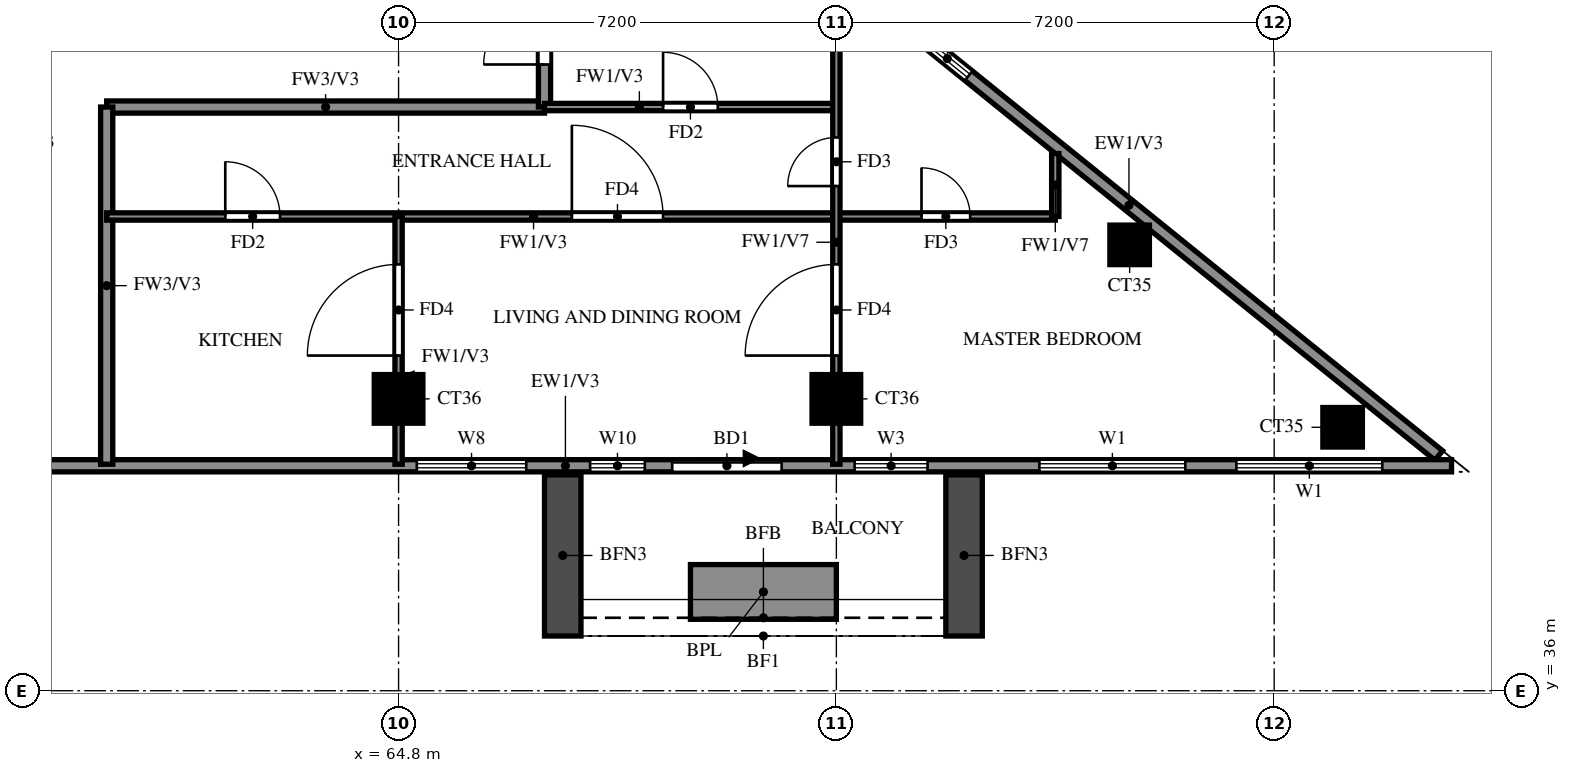
"""IFC4 building model, lengths in metres.
Left out: names, types, materials, properties, quantities, classifications, styles, units other than length and angle.
Written with IfcOpenShell. Run it as: python <this file> out.ifc"""

import sys

from ifc_helpers import new_model, si_unit, direction, frame, frame_2d, origin, origin_2d, place, context, subcontext, project, spatial, rectangle, extrude, source, transform, mapped, element, fill, save


model = new_model("IFC4")
c1 = context("Model", 3, precision=1e-05, world=origin(), true_north=direction((0.0, 1.0)))
c2 = subcontext(c1, "Body", "Model", "MODEL_VIEW")
j1 = project(units=[si_unit("LENGTHUNIT", "METRE"), si_unit("PLANEANGLEUNIT", "RADIAN")], contexts=[c1])
p1 = place(None, origin())
s1 = spatial("IfcSite", under=j1, at=p1, CompositionType="ELEMENT")
p2 = place(p1, origin())
s2 = spatial("IfcBuilding", under=s1, at=p2, CompositionType="ELEMENT")
p3 = place(p2, frame((0.0, 0.0, 236.0)))
s3 = spatial("IfcBuildingStorey", under=s2, at=p3, CompositionType="ELEMENT", Elevation=236.0)
m1 = source(origin(), c2, "Body", "SweptSolid", [
    extrude(rectangle(XDim=0.65, YDim=0.65, at=origin_2d()), origin(), (0.0, 0.0, 1.0), 3.22),
])
p4 = place(p3, frame((80.326, 40.333, 0.0), z_axis=(0.0, 0.0, 1.0), x_axis=(1.0, 0.0, 0.0)))
e1 = element("IfcColumn", 1, at=p4, inside=s3, PredefinedType="COLUMN", context=c2, shape_type="MappedRepresentation", body=[
    mapped(m1, transform((0.0, 0.0, 0.0))),
])
m2 = source(origin(), c2, "Body", "SweptSolid", [
    extrude(rectangle(XDim=0.8, YDim=0.8, at=origin_2d()), origin(), (0.0, 0.0, 1.0), 3.22),
])
for number, where, z_axis, x_axis in (
    (2, (64.8, 40.8, 0.0), (0.0, 0.0, 1.0), (1.0, 0.0, 0.0)),
    (3, (72.0, 40.8, 0.0), (0.0, 0.0, 1.0), (1.0, 0.0, 0.0)),
):
    element("IfcColumn", number, at=place(p3, frame(where, z_axis=z_axis, x_axis=x_axis)), inside=s3, PredefinedType="COLUMN", context=c2, shape_type="MappedRepresentation", body=[
        mapped(m2, transform((0.0, 0.0, 0.0))),
    ])
p5 = place(p3, frame((76.823, 43.333, 0.0), z_axis=(0.0, 0.0, 1.0), x_axis=(1.0, 0.0, 0.0)))
e4 = element("IfcColumn", 4, at=p5, inside=s3, PredefinedType="COLUMN", context=c2, shape_type="MappedRepresentation", body=[
    mapped(m1, transform((0.0, 0.0, 0.0))),
])
p6 = place(p3, frame((81.907, 39.87, 0.0), z_axis=(0.0, 0.0, 1.0), x_axis=(-0.777936274417, 0.62834318087, 0.0)))
e5 = element("IfcWall", 5, at=p6, inside=s3, PredefinedType="SOLIDWALL", context=c2, shape_type="SweptSolid", body=[
    extrude(rectangle(XDim=13.099, YDim=0.2, at=frame_2d((6.549, 0.0))), origin(), (0.0, 0.0, 1.0), 3.22),
])
p7 = place(p6, frame((9.938, 0.0, 1.5)))
e6 = element("IfcOpeningElement", 6, at=p7, cuts=e5, PredefinedType="OPENING", context=c2, shape_type="SweptSolid", body=[
    extrude(rectangle(XDim=0.9, YDim=0.9, at=frame_2d((0.45, 0.45))), frame((0.0, 0.11, 0.0), z_axis=(0.0, -1.0, 0.0), x_axis=(1.0, 0.0, 0.0)), (0.0, 0.0, 1.0), 0.22),
])
p8 = place(p3, frame((58.8, 39.7, 0.0), z_axis=(0.0, 0.0, 1.0), x_axis=(1.0, 0.0, 0.0)))
e7 = element("IfcWall", 7, at=p8, inside=s3, PredefinedType="SOLIDWALL", context=c2, shape_type="SweptSolid", body=[
    extrude(rectangle(XDim=23.317, YDim=0.2, at=frame_2d((11.658, 0.0))), origin(), (0.0, 0.0, 1.0), 3.22),
])
p9 = place(p8, frame((10.5, 0.0, 0.0)))
e8 = element("IfcOpeningElement", 8, at=p9, cuts=e7, PredefinedType="OPENING", context=c2, shape_type="SweptSolid", body=[
    extrude(rectangle(XDim=1.8, YDim=2.4, at=frame_2d((0.9, 1.2))), frame((0.0, 0.11, 0.0), z_axis=(0.0, -1.0, 0.0), x_axis=(1.0, 0.0, 0.0)), (0.0, 0.0, 1.0), 0.22),
])
p10 = place(p8, frame((6.3, 0.0, 0.6)))
e9 = element("IfcOpeningElement", 9, at=p10, cuts=e7, PredefinedType="OPENING", context=c2, shape_type="SweptSolid", body=[
    extrude(rectangle(XDim=1.8, YDim=2.4, at=frame_2d((0.9, 1.2))), frame((0.0, 0.11, 0.0), z_axis=(0.0, -1.0, 0.0), x_axis=(1.0, 0.0, 0.0)), (0.0, 0.0, 1.0), 0.22),
])
p11 = place(p8, frame((9.15, 0.0, 0.6)))
e10 = element("IfcOpeningElement", 10, at=p11, cuts=e7, PredefinedType="OPENING", context=c2, shape_type="SweptSolid", body=[
    extrude(rectangle(XDim=0.9, YDim=2.4, at=frame_2d((0.45, 1.2))), frame((0.0, 0.11, 0.0), z_axis=(0.0, -1.0, 0.0), x_axis=(1.0, 0.0, 0.0)), (0.0, 0.0, 1.0), 0.22),
])
p12 = place(p8, frame((13.5, 0.0, 0.6)))
e11 = element("IfcOpeningElement", 11, at=p12, cuts=e7, PredefinedType="OPENING", context=c2, shape_type="SweptSolid", body=[
    extrude(rectangle(XDim=1.2, YDim=2.4, at=frame_2d((0.6, 1.2))), frame((0.0, 0.11, 0.0), z_axis=(0.0, -1.0, 0.0), x_axis=(1.0, 0.0, 0.0)), (0.0, 0.0, 1.0), 0.22),
])
p13 = place(p8, frame((16.539, 0.0, 0.6)))
e12 = element("IfcOpeningElement", 12, at=p13, cuts=e7, PredefinedType="OPENING", context=c2, shape_type="SweptSolid", body=[
    extrude(rectangle(XDim=2.4, YDim=2.4, at=frame_2d((1.2, 1.2))), frame((0.0, 0.11, 0.0), z_axis=(0.0, -1.0, 0.0), x_axis=(1.0, 0.0, 0.0)), (0.0, 0.0, 1.0), 0.22),
])
p14 = place(p8, frame((19.778, 0.0, 0.6)))
e13 = element("IfcOpeningElement", 13, at=p14, cuts=e7, PredefinedType="OPENING", context=c2, shape_type="SweptSolid", body=[
    extrude(rectangle(XDim=2.4, YDim=2.4, at=frame_2d((1.2, 1.2))), frame((0.0, 0.11, 0.0), z_axis=(0.0, -1.0, 0.0), x_axis=(1.0, 0.0, 0.0)), (0.0, 0.0, 1.0), 0.22),
])
for number, where, z_axis, x_axis in (
    (14, (67.5, 39.55, 0.0), (0.0, 0.0, 1.0), (0.0, -1.0, 0.0)),
    (15, (74.1, 39.55, 0.0), (0.0, 0.0, 1.0), (0.0, -1.0, 0.0)),
):
    element("IfcWall", number, at=place(p3, frame(where, z_axis=z_axis, x_axis=x_axis)), inside=s3, PredefinedType="SOLIDWALL", context=c2, shape_type="SweptSolid", body=[
        extrude(rectangle(XDim=2.65, YDim=0.6, at=frame_2d((1.325, 0.0))), origin(), (0.0, 0.0, 1.0), 2.85),
    ])
p15 = place(p3, frame((69.6, 37.625, 0.0), z_axis=(0.0, 0.0, 1.0), x_axis=(1.0, 0.0, 0.0)))
e16 = element("IfcWall", 16, at=p15, inside=s3, PredefinedType="SOLIDWALL", context=c2, shape_type="SweptSolid", body=[
    extrude(rectangle(XDim=2.4, YDim=0.9, at=frame_2d((1.2, 0.0))), origin(), (0.0, 0.0, 1.0), 0.9),
])
p16 = place(p3, frame((60.0, 45.6, 0.0), z_axis=(0.0, 0.0, 1.0), x_axis=(1.0, 0.0, 0.0)))
e17 = element("IfcWall", 17, at=p16, inside=s3, PredefinedType="SOLIDWALL", context=c2, shape_type="SweptSolid", body=[
    extrude(rectangle(XDim=7.2, YDim=0.2, at=frame_2d((3.6, 0.0))), origin(), (0.0, 0.0, 1.0), 3.22),
])
p17 = place(p3, frame((60.0, 39.725, 0.0), z_axis=(0.0, 0.0, 1.0), x_axis=(0.0, 1.0, 0.0)))
e18 = element("IfcWall", 18, at=p17, inside=s3, PredefinedType="SOLIDWALL", context=c2, shape_type="SweptSolid", body=[
    extrude(rectangle(XDim=5.875, YDim=0.2, at=frame_2d((2.938, 0.0))), origin(), (0.0, 0.0, 1.0), 3.22),
])
p18 = place(p3, frame((67.2, 45.6, 0.0), z_axis=(0.0, 0.0, 1.0), x_axis=(0.0, 1.0, 0.0)))
e19 = element("IfcWall", 19, at=p18, inside=s3, PredefinedType="SOLIDWALL", context=c2, shape_type="SweptSolid", body=[
    extrude(rectangle(XDim=16.8, YDim=0.2, at=frame_2d((8.4, 0.0))), origin(), (0.0, 0.0, 1.0), 3.22),
])
p19 = place(p18, frame((6.7, 0.0, 0.0)))
e20 = element("IfcOpeningElement", 20, at=p19, cuts=e19, PredefinedType="OPENING", context=c2, shape_type="SweptSolid", body=[
    extrude(rectangle(XDim=1.0, YDim=2.1, at=frame_2d((0.5, 1.05))), frame((0.0, 0.11, 0.0), z_axis=(0.0, -1.0, 0.0), x_axis=(1.0, 0.0, 0.0)), (0.0, 0.0, 1.0), 0.22),
])
p20 = place(p18, frame((15.1, 0.0, 0.0)))
e21 = element("IfcOpeningElement", 21, at=p20, cuts=e19, PredefinedType="OPENING", context=c2, shape_type="SweptSolid", body=[
    extrude(rectangle(XDim=1.0, YDim=2.1, at=frame_2d((0.5, 1.05))), frame((0.0, 0.11, 0.0), z_axis=(0.0, -1.0, 0.0), x_axis=(1.0, 0.0, 0.0)), (0.0, 0.0, 1.0), 0.22),
])
p21 = place(p18, frame((0.7, 0.0, 0.0)))
e22 = element("IfcOpeningElement", 22, at=p21, cuts=e19, PredefinedType="OPENING", context=c2, shape_type="SweptSolid", body=[
    extrude(rectangle(XDim=1.0, YDim=2.1, at=frame_2d((0.5, 1.05))), frame((0.0, 0.11, 0.0), z_axis=(0.0, -1.0, 0.0), x_axis=(1.0, 0.0, 0.0)), (0.0, 0.0, 1.0), 0.22),
])
p22 = place(p3, frame((60.0, 43.8, 0.0), z_axis=(0.0, 0.0, 1.0), x_axis=(1.0, 0.0, 0.0)))
e23 = element("IfcWall", 23, at=p22, inside=s3, PredefinedType="PARTITIONING", context=c2, shape_type="SweptSolid", body=[
    extrude(rectangle(XDim=15.6, YDim=0.12, at=frame_2d((7.8, 0.0))), origin(), (0.0, 0.0, 1.0), 3.22),
])
p23 = place(p22, frame((7.65, 0.0, 0.0)))
e24 = element("IfcOpeningElement", 24, at=p23, cuts=e23, PredefinedType="OPENING", context=c2, shape_type="SweptSolid", body=[
    extrude(rectangle(XDim=1.5, YDim=2.1, at=frame_2d((0.75, 1.05))), frame((0.0, 0.07, 0.0), z_axis=(0.0, -1.0, 0.0), x_axis=(1.0, 0.0, 0.0)), (0.0, 0.0, 1.0), 0.14),
])
p24 = place(p22, frame((1.95, 0.0, 0.0)))
e25 = element("IfcOpeningElement", 25, at=p24, cuts=e23, PredefinedType="OPENING", context=c2, shape_type="SweptSolid", body=[
    extrude(rectangle(XDim=0.9, YDim=2.1, at=frame_2d((0.45, 1.05))), frame((0.0, 0.07, 0.0), z_axis=(0.0, -1.0, 0.0), x_axis=(1.0, 0.0, 0.0)), (0.0, 0.0, 1.0), 0.14),
])
p25 = place(p22, frame((13.4, 0.0, 0.0)))
e26 = element("IfcOpeningElement", 26, at=p25, cuts=e23, PredefinedType="OPENING", context=c2, shape_type="SweptSolid", body=[
    extrude(rectangle(XDim=0.8, YDim=2.1, at=frame_2d((0.4, 1.05))), frame((0.0, 0.07, 0.0), z_axis=(0.0, -1.0, 0.0), x_axis=(1.0, 0.0, 0.0)), (0.0, 0.0, 1.0), 0.14),
])
p26 = place(p3, frame((67.2, 45.6, 0.0), z_axis=(0.0, 0.0, 1.0), x_axis=(1.0, 0.0, 0.0)))
e27 = element("IfcWall", 27, at=p26, inside=s3, PredefinedType="PARTITIONING", context=c2, shape_type="SweptSolid", body=[
    extrude(rectangle(XDim=4.8, YDim=0.12, at=frame_2d((2.4, 0.0))), origin(), (0.0, 0.0, 1.0), 3.22),
])
p27 = place(p26, frame((1.95, 0.0, 0.0)))
e28 = element("IfcOpeningElement", 28, at=p27, cuts=e27, PredefinedType="OPENING", context=c2, shape_type="SweptSolid", body=[
    extrude(rectangle(XDim=0.9, YDim=2.1, at=frame_2d((0.45, 1.05))), frame((0.0, 0.07, 0.0), z_axis=(0.0, -1.0, 0.0), x_axis=(1.0, 0.0, 0.0)), (0.0, 0.0, 1.0), 0.14),
])
p28 = place(p3, frame((64.8, 39.725, 0.0), z_axis=(0.0, 0.0, 1.0), x_axis=(0.0, 1.0, 0.0)))
e29 = element("IfcWall", 29, at=p28, inside=s3, PredefinedType="PARTITIONING", context=c2, shape_type="SweptSolid", body=[
    extrude(rectangle(XDim=4.075, YDim=0.12, at=frame_2d((2.038, 0.0))), origin(), (0.0, 0.0, 1.0), 3.22),
])
p29 = place(p28, frame((1.788, 0.0, 0.0)))
e30 = element("IfcOpeningElement", 30, at=p29, cuts=e29, PredefinedType="OPENING", context=c2, shape_type="SweptSolid", body=[
    extrude(rectangle(XDim=1.5, YDim=2.1, at=frame_2d((0.75, 1.05))), frame((0.0, 0.07, 0.0), z_axis=(0.0, -1.0, 0.0), x_axis=(1.0, 0.0, 0.0)), (0.0, 0.0, 1.0), 0.14),
])
p30 = place(p3, frame((72.0, 39.725, 0.0), z_axis=(0.0, 0.0, 1.0), x_axis=(0.0, 1.0, 0.0)))
e31 = element("IfcWall", 31, at=p30, inside=s3, PredefinedType="PARTITIONING", context=c2, shape_type="SweptSolid", body=[
    extrude(rectangle(XDim=8.114, YDim=0.12, at=frame_2d((4.057, 0.0))), origin(), (0.0, 0.0, 1.0), 2.32),
])
p31 = place(p30, frame((1.788, 0.0, 0.0)))
e32 = element("IfcOpeningElement", 32, at=p31, cuts=e31, PredefinedType="OPENING", context=c2, shape_type="SweptSolid", body=[
    extrude(rectangle(XDim=1.5, YDim=2.1, at=frame_2d((0.75, 1.05))), frame((0.0, 0.07, 0.0), z_axis=(0.0, -1.0, 0.0), x_axis=(1.0, 0.0, 0.0)), (0.0, 0.0, 1.0), 0.14),
])
p32 = place(p30, frame((4.575, 0.0, 0.0)))
e33 = element("IfcOpeningElement", 33, at=p32, cuts=e31, PredefinedType="OPENING", context=c2, shape_type="SweptSolid", body=[
    extrude(rectangle(XDim=0.8, YDim=2.1, at=frame_2d((0.4, 1.05))), frame((0.0, 0.07, 0.0), z_axis=(0.0, -1.0, 0.0), x_axis=(1.0, 0.0, 0.0)), (0.0, 0.0, 1.0), 0.14),
])
p33 = place(p3, frame((75.6, 43.8, 0.0), z_axis=(0.0, 0.0, 1.0), x_axis=(0.0, 1.0, 0.0)))
e34 = element("IfcWall", 34, at=p33, inside=s3, PredefinedType="PARTITIONING", context=c2, shape_type="SweptSolid", body=[
    extrude(rectangle(XDim=1.035, YDim=0.12, at=frame_2d((0.518, 0.0))), origin(), (0.0, 0.0, 1.0), 2.32),
])
p34 = place(p7, origin())
e35 = element("IfcWindow", 35, at=p34, inside=s3, PartitioningType="SINGLE_PANEL", PredefinedType="WINDOW", context=c2, shape_type="SweptSolid", body=[
    extrude(rectangle(XDim=0.9, YDim=0.9, at=frame_2d((0.45, 0.45))), frame((0.0, 0.03, 0.0), z_axis=(0.0, -1.0, 0.0), x_axis=(1.0, 0.0, 0.0)), (0.0, 0.0, 1.0), 0.06),
])
fill(e6, e35)
p35 = place(p9, origin())
e36 = element("IfcDoor", 36, at=p35, inside=s3, OperationType="DOUBLE_DOOR_SLIDING", PredefinedType="DOOR", context=c2, shape_type="SweptSolid", body=[
    extrude(rectangle(XDim=1.8, YDim=2.4, at=frame_2d((0.9, 1.2))), frame((0.0, 0.025, 0.0), z_axis=(0.0, -1.0, 0.0), x_axis=(1.0, 0.0, 0.0)), (0.0, 0.0, 1.0), 0.05),
])
fill(e8, e36)
p36 = place(p10, origin())
e37 = element("IfcWindow", 37, at=p36, inside=s3, PartitioningType="DOUBLE_PANEL_VERTICAL", PredefinedType="WINDOW", context=c2, shape_type="SweptSolid", body=[
    extrude(rectangle(XDim=1.8, YDim=2.4, at=frame_2d((0.9, 1.2))), frame((0.0, 0.03, 0.0), z_axis=(0.0, -1.0, 0.0), x_axis=(1.0, 0.0, 0.0)), (0.0, 0.0, 1.0), 0.06),
])
fill(e9, e37)
p37 = place(p11, origin())
e38 = element("IfcWindow", 38, at=p37, inside=s3, PartitioningType="SINGLE_PANEL", PredefinedType="WINDOW", context=c2, shape_type="SweptSolid", body=[
    extrude(rectangle(XDim=0.9, YDim=2.4, at=frame_2d((0.45, 1.2))), frame((0.0, 0.03, 0.0), z_axis=(0.0, -1.0, 0.0), x_axis=(1.0, 0.0, 0.0)), (0.0, 0.0, 1.0), 0.06),
])
fill(e10, e38)
p38 = place(p12, origin())
e39 = element("IfcWindow", 39, at=p38, inside=s3, PartitioningType="SINGLE_PANEL", PredefinedType="WINDOW", context=c2, shape_type="SweptSolid", body=[
    extrude(rectangle(XDim=1.2, YDim=2.4, at=frame_2d((0.6, 1.2))), frame((0.0, 0.03, 0.0), z_axis=(0.0, -1.0, 0.0), x_axis=(1.0, 0.0, 0.0)), (0.0, 0.0, 1.0), 0.06),
])
fill(e11, e39)
p39 = place(p13, origin())
e40 = element("IfcWindow", 40, at=p39, inside=s3, PartitioningType="DOUBLE_PANEL_VERTICAL", PredefinedType="WINDOW", context=c2, shape_type="SweptSolid", body=[
    extrude(rectangle(XDim=2.4, YDim=2.4, at=frame_2d((1.2, 1.2))), frame((0.0, 0.03, 0.0), z_axis=(0.0, -1.0, 0.0), x_axis=(1.0, 0.0, 0.0)), (0.0, 0.0, 1.0), 0.06),
])
fill(e12, e40)
p40 = place(p14, origin())
e41 = element("IfcWindow", 41, at=p40, inside=s3, PartitioningType="DOUBLE_PANEL_VERTICAL", PredefinedType="WINDOW", context=c2, shape_type="SweptSolid", body=[
    extrude(rectangle(XDim=2.4, YDim=2.4, at=frame_2d((1.2, 1.2))), frame((0.0, 0.03, 0.0), z_axis=(0.0, -1.0, 0.0), x_axis=(1.0, 0.0, 0.0)), (0.0, 0.0, 1.0), 0.06),
])
fill(e13, e41)
p41 = place(p29, origin())
e42 = element("IfcDoor", 42, at=p41, inside=s3, OperationType="SINGLE_SWING_RIGHT", PredefinedType="DOOR", context=c2, shape_type="SweptSolid", body=[
    extrude(rectangle(XDim=1.5, YDim=2.1, at=frame_2d((0.75, 1.05))), frame((0.0, 0.025, 0.0), z_axis=(0.0, -1.0, 0.0), x_axis=(1.0, 0.0, 0.0)), (0.0, 0.0, 1.0), 0.05),
])
fill(e30, e42)
p42 = place(p27, origin())
e43 = element("IfcDoor", 43, at=p42, inside=s3, OperationType="SINGLE_SWING_LEFT", PredefinedType="DOOR", context=c2, shape_type="SweptSolid", body=[
    extrude(rectangle(XDim=0.9, YDim=2.1, at=frame_2d((0.45, 1.05))), frame((0.0, 0.025, 0.0), z_axis=(0.0, -1.0, 0.0), x_axis=(1.0, 0.0, 0.0)), (0.0, 0.0, 1.0), 0.05),
])
fill(e28, e43)
p43 = place(p21, origin())
e44 = element("IfcDoor", 44, at=p43, inside=s3, OperationType="SINGLE_SWING_RIGHT", PredefinedType="DOOR", context=c2, shape_type="SweptSolid", body=[
    extrude(rectangle(XDim=1.0, YDim=2.1, at=frame_2d((0.5, 1.05))), frame((0.0, 0.025, 0.0), z_axis=(0.0, -1.0, 0.0), x_axis=(1.0, 0.0, 0.0)), (0.0, 0.0, 1.0), 0.05),
])
fill(e22, e44)
p44 = place(p23, origin())
e45 = element("IfcDoor", 45, at=p44, inside=s3, OperationType="SINGLE_SWING_LEFT", PredefinedType="DOOR", context=c2, shape_type="SweptSolid", body=[
    extrude(rectangle(XDim=1.5, YDim=2.1, at=frame_2d((0.75, 1.05))), frame((0.0, 0.025, 0.0), z_axis=(0.0, -1.0, 0.0), x_axis=(1.0, 0.0, 0.0)), (0.0, 0.0, 1.0), 0.05),
])
fill(e24, e45)
p45 = place(p24, origin())
e46 = element("IfcDoor", 46, at=p45, inside=s3, OperationType="SINGLE_SWING_LEFT", PredefinedType="DOOR", context=c2, shape_type="SweptSolid", body=[
    extrude(rectangle(XDim=0.9, YDim=2.1, at=frame_2d((0.45, 1.05))), frame((0.0, 0.025, 0.0), z_axis=(0.0, -1.0, 0.0), x_axis=(1.0, 0.0, 0.0)), (0.0, 0.0, 1.0), 0.05),
])
fill(e25, e46)
p46 = place(p31, origin())
e47 = element("IfcDoor", 47, at=p46, inside=s3, OperationType="SINGLE_SWING_LEFT", PredefinedType="DOOR", context=c2, shape_type="SweptSolid", body=[
    extrude(rectangle(XDim=1.5, YDim=2.1, at=frame_2d((0.75, 1.05))), frame((0.0, 0.025, 0.0), z_axis=(0.0, -1.0, 0.0), x_axis=(1.0, 0.0, 0.0)), (0.0, 0.0, 1.0), 0.05),
])
fill(e32, e47)
p47 = place(p32, origin())
e48 = element("IfcDoor", 48, at=p47, inside=s3, OperationType="SINGLE_SWING_LEFT", PredefinedType="DOOR", context=c2, shape_type="SweptSolid", body=[
    extrude(rectangle(XDim=0.8, YDim=2.1, at=frame_2d((0.4, 1.05))), frame((0.0, 0.025, 0.0), z_axis=(0.0, -1.0, 0.0), x_axis=(1.0, 0.0, 0.0)), (0.0, 0.0, 1.0), 0.05),
])
fill(e33, e48)
p48 = place(p25, origin())
e49 = element("IfcDoor", 49, at=p48, inside=s3, OperationType="SINGLE_SWING_LEFT", PredefinedType="DOOR", context=c2, shape_type="SweptSolid", body=[
    extrude(rectangle(XDim=0.8, YDim=2.1, at=frame_2d((0.4, 1.05))), frame((0.0, 0.025, 0.0), z_axis=(0.0, -1.0, 0.0), x_axis=(1.0, 0.0, 0.0)), (0.0, 0.0, 1.0), 0.05),
])
fill(e26, e49)
save(model, sys.argv[1])
